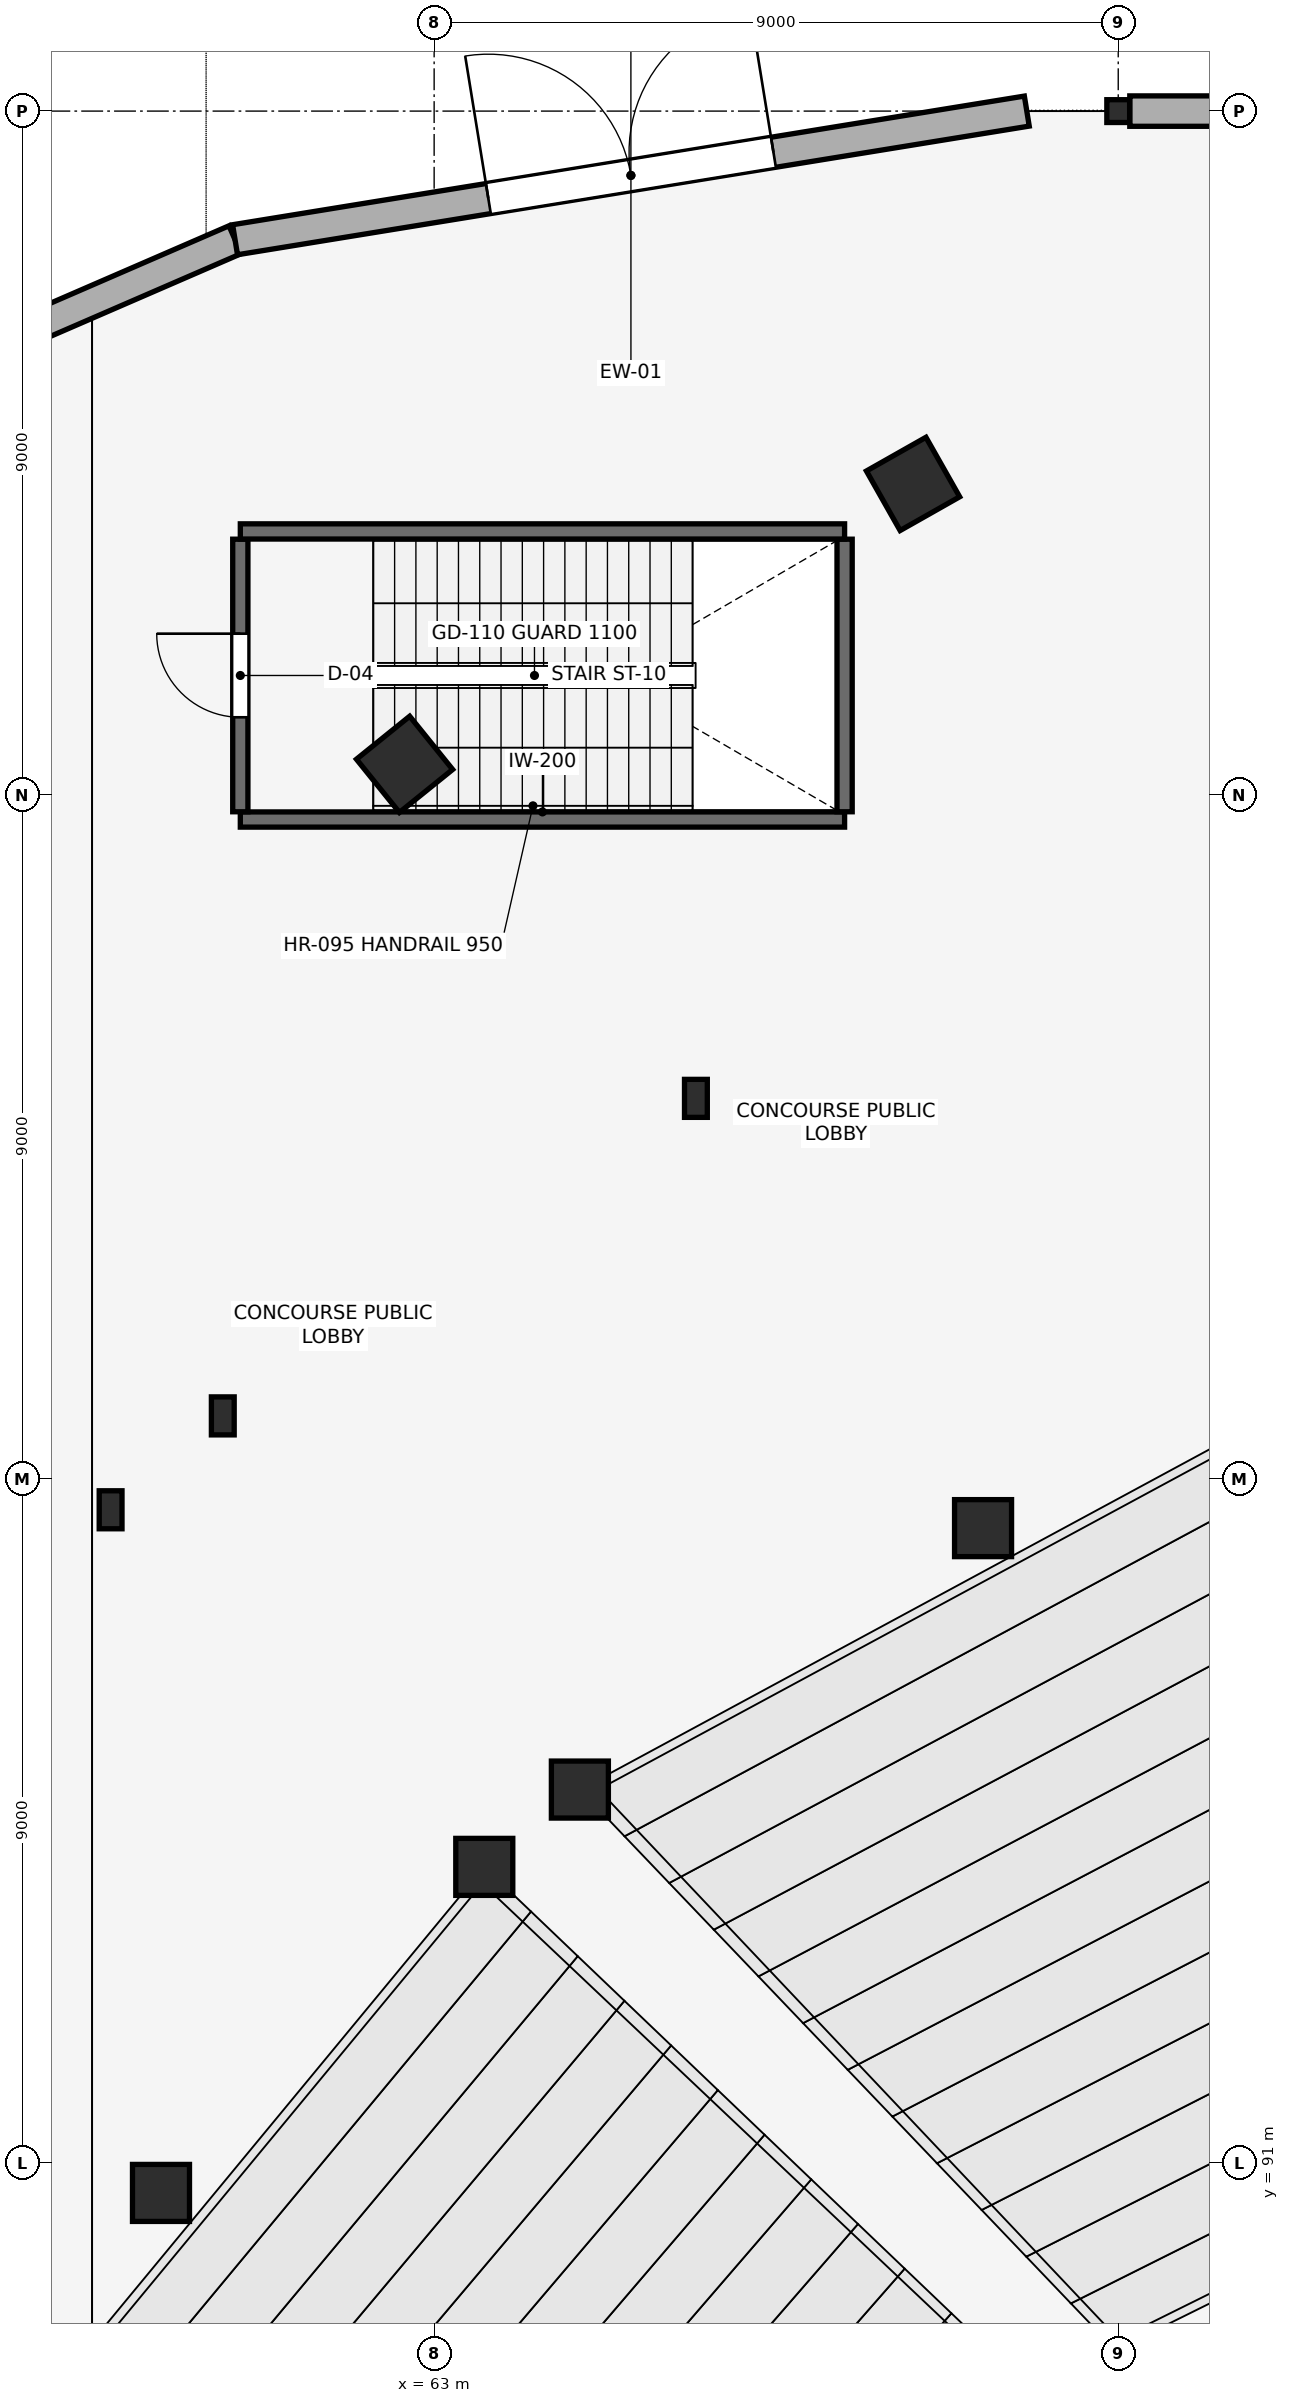
"""IFC4 building model, lengths in metres.
Left out: names, types, materials, properties, quantities, classifications, styles, units other than length and angle.
Written with IfcOpenShell. Run it as: python <this file> out.ifc"""

import sys

from ifc_helpers import new_model, si_unit, direction, frame, frame_2d, origin, origin_2d, place, context, subcontext, project, spatial, rectangle, hollow_rectangle, i_section, extrude, element, fill, save


model = new_model("IFC4")
c1 = context("Model", 3, precision=1e-05, world=origin(), true_north=direction((0.0, 1.0)))
c2 = subcontext(c1, "Body", "Model", "MODEL_VIEW")
j1 = project(units=[si_unit("LENGTHUNIT", "METRE"), si_unit("PLANEANGLEUNIT", "RADIAN")], contexts=[c1])
p1 = place(None, origin())
s1 = spatial("IfcSite", under=j1, at=p1, CompositionType="ELEMENT")
p2 = place(p1, origin())
s2 = spatial("IfcBuilding", under=s1, at=p2, CompositionType="ELEMENT")
p3 = place(p2, origin())
s3 = spatial("IfcBuildingStorey", under=s2, at=p3, CompositionType="ELEMENT", Elevation=0.0)
for number, where, z_axis, x_axis in (
    (1, (69.301, 113.095, 0.0), (0.0, 0.0, 1.0), (-0.493, 0.87, 0.0)),
    (2, (62.611, 109.406, 0.0), (0.0, 0.0, 1.0), (-0.628, 0.778, 0.0)),
):
    element("IfcColumn", number, at=place(p3, frame(where, z_axis=z_axis, x_axis=x_axis)), inside=s3, PredefinedType="COLUMN", context=c2, shape_type="SweptSolid", body=[
        extrude(rectangle(XDim=0.9, YDim=0.9, at=origin_2d()), origin(), (0.0, 0.0, 1.0), 5.4),
    ])
p4 = place(p3, frame((64.917, 95.918, 0.0), z_axis=(0.0, 0.0, 1.0), x_axis=(1.0, 0.0, 0.0)))
e3 = element("IfcColumn", 3, at=p4, inside=s3, PredefinedType="COLUMN", context=c2, shape_type="SweptSolid", body=[
    extrude(rectangle(XDim=0.75, YDim=0.75, at=origin_2d()), origin(), (0.0, 0.0, 1.0), 5.4),
])
p5 = place(p3, frame((60.219, 100.834, 0.0), z_axis=(0.0, 0.0, 1.0), x_axis=(1.0, 0.0, 0.0)))
e4 = element("IfcColumn", 4, at=p5, inside=s3, PredefinedType="COLUMN", context=c2, shape_type="SweptSolid", body=[
    extrude(i_section(OverallWidth=0.3, OverallDepth=0.5, WebThickness=0.014, FlangeThickness=0.028, FilletRadius=0.027, at=origin_2d()), origin(), (0.0, 0.0, 1.0), 5.4),
])
p6 = place(p3, frame((63.66, 94.901, 0.0), z_axis=(0.0, 0.0, 1.0), x_axis=(1.0, 0.0, 0.0)))
e5 = element("IfcColumn", 5, at=p6, inside=s3, PredefinedType="COLUMN", context=c2, shape_type="SweptSolid", body=[
    extrude(rectangle(XDim=0.75, YDim=0.75, at=origin_2d()), origin(), (0.0, 0.0, 1.0), 5.4),
])
p7 = place(p3, frame((58.743, 99.599, 0.0), z_axis=(0.0, 0.0, 1.0), x_axis=(1.0, 0.0, 0.0)))
e6 = element("IfcColumn", 6, at=p7, inside=s3, PredefinedType="COLUMN", context=c2, shape_type="SweptSolid", body=[
    extrude(i_section(OverallWidth=0.3, OverallDepth=0.5, WebThickness=0.014, FlangeThickness=0.028, FilletRadius=0.027, at=origin_2d()), origin(), (0.0, 0.0, 1.0), 5.4),
])
p8 = place(p3, frame((72.0, 118.0, 0.0), z_axis=(0.0, 0.0, 1.0), x_axis=(1.0, 0.0, 0.0)))
e7 = element("IfcColumn", 7, at=p8, inside=s3, PredefinedType="COLUMN", context=c2, shape_type="SweptSolid", body=[
    extrude(hollow_rectangle(XDim=0.3, YDim=0.3, WallThickness=0.012, at=origin_2d()), origin(), (0.0, 0.0, 1.0), 5.4),
])
p9 = place(p3, frame((70.222, 99.358, 0.0), z_axis=(0.0, 0.0, 1.0), x_axis=(1.0, 0.0, 0.0)))
e8 = element("IfcColumn", 8, at=p9, inside=s3, PredefinedType="COLUMN", context=c2, shape_type="SweptSolid", body=[
    extrude(rectangle(XDim=0.75, YDim=0.75, at=origin_2d()), origin(), (0.0, 0.0, 1.0), 5.4),
])
p10 = place(p3, frame((66.444, 105.012, 0.0), z_axis=(0.0, 0.0, 1.0), x_axis=(1.0, 0.0, 0.0)))
e9 = element("IfcColumn", 9, at=p10, inside=s3, PredefinedType="COLUMN", context=c2, shape_type="SweptSolid", body=[
    extrude(i_section(OverallWidth=0.3, OverallDepth=0.5, WebThickness=0.014, FlangeThickness=0.028, FilletRadius=0.027, at=origin_2d()), origin(), (0.0, 0.0, 1.0), 5.4),
])
p11 = place(p3, frame((59.406, 90.612, 0.0), z_axis=(0.0, 0.0, 1.0), x_axis=(1.0, 0.0, 0.0)))
e10 = element("IfcColumn", 10, at=p11, inside=s3, PredefinedType="COLUMN", context=c2, shape_type="SweptSolid", body=[
    extrude(rectangle(XDim=0.75, YDim=0.75, at=origin_2d()), origin(), (0.0, 0.0, 1.0), 5.4),
])
p12 = place(p3, frame((50.768, 112.138, 0.0), z_axis=(0.0, 0.0, 1.0), x_axis=(0.917436013805, 0.397883350461, 0.0)))
e11 = element("IfcWall", 11, at=p12, inside=s3, PredefinedType="STANDARD", context=c2, shape_type="SweptSolid", body=[
    extrude(rectangle(XDim=10.479, YDim=0.4, at=frame_2d((5.239, 0.0))), origin(), (0.0, 0.0, 1.0), 5.12),
])
p13 = place(p12, frame((3.339, 0.0, 0.0)))
e12 = element("IfcOpeningElement", 12, at=p13, cuts=e11, PredefinedType="OPENING", context=c2, shape_type="SweptSolid", body=[
    extrude(rectangle(XDim=3.8, YDim=2.8, at=frame_2d((1.9, 1.4))), frame((0.0, 0.21, 0.0), z_axis=(0.0, -1.0, 0.0), x_axis=(1.0, 0.0, 0.0)), (0.0, 0.0, 1.0), 0.42),
])
p14 = place(p3, frame((60.381, 116.308, 0.0), z_axis=(0.0, 0.0, 1.0), x_axis=(0.987056625979, 0.160372120738, 0.0)))
e13 = element("IfcWall", 13, at=p14, inside=s3, PredefinedType="STANDARD", context=c2, shape_type="SweptSolid", body=[
    extrude(rectangle(XDim=10.553, YDim=0.4, at=frame_2d((5.276, 0.0))), origin(), (0.0, 0.0, 1.0), 5.12),
])
p15 = place(p14, frame((3.376, 0.0, 0.0)))
e14 = element("IfcOpeningElement", 14, at=p15, cuts=e13, PredefinedType="OPENING", context=c2, shape_type="SweptSolid", body=[
    extrude(rectangle(XDim=3.8, YDim=2.8, at=frame_2d((1.9, 1.4))), frame((0.0, 0.21, 0.0), z_axis=(0.0, -1.0, 0.0), x_axis=(1.0, 0.0, 0.0)), (0.0, 0.0, 1.0), 0.42),
])
p16 = place(p3, frame((72.152, 118.0, 0.0), z_axis=(0.0, 0.0, 1.0), x_axis=(1.0, 0.0, 0.0)))
e15 = element("IfcWall", 15, at=p16, inside=s3, PredefinedType="STANDARD", context=c2, shape_type="SweptSolid", body=[
    extrude(rectangle(XDim=9.608, YDim=0.4, at=frame_2d((4.804, 0.0))), origin(), (0.0, 0.0, 1.0), 5.12),
])
p17 = place(p16, frame((2.904, 0.0, 0.0)))
e16 = element("IfcOpeningElement", 16, at=p17, cuts=e15, PredefinedType="OPENING", context=c2, shape_type="SweptSolid", body=[
    extrude(rectangle(XDim=3.8, YDim=2.8, at=frame_2d((1.9, 1.4))), frame((0.0, 0.21, 0.0), z_axis=(0.0, -1.0, 0.0), x_axis=(1.0, 0.0, 0.0)), (0.0, 0.0, 1.0), 0.42),
])
p18 = place(p3, frame((60.45, 108.68, 0.0), z_axis=(0.0, 0.0, 1.0), x_axis=(1.0, 0.0, 0.0)))
e17 = element("IfcWall", 17, at=p18, inside=s3, PredefinedType="SHEAR", context=c2, shape_type="SweptSolid", body=[
    extrude(rectangle(XDim=7.95, YDim=0.2, at=frame_2d((3.975, 0.0))), origin(), (0.0, 0.0, 1.0), 5.4),
])
p19 = place(p3, frame((60.45, 108.782, 0.0), z_axis=(0.0, 0.0, 1.0), x_axis=(0.0, 1.0, 0.0)))
e18 = element("IfcWall", 18, at=p19, inside=s3, PredefinedType="SHEAR", context=c2, shape_type="SweptSolid", body=[
    extrude(rectangle(XDim=3.586, YDim=0.2, at=frame_2d((1.793, 0.0))), origin(), (0.0, 0.0, 1.0), 5.4),
])
p20 = place(p19, frame((1.243, 0.0, 0.0)))
e19 = element("IfcOpeningElement", 19, at=p20, cuts=e18, PredefinedType="OPENING", context=c2, shape_type="SweptSolid", body=[
    extrude(rectangle(XDim=1.1, YDim=2.15, at=frame_2d((0.55, 1.075))), frame((0.0, 0.11, 0.0), z_axis=(0.0, -1.0, 0.0), x_axis=(1.0, 0.0, 0.0)), (0.0, 0.0, 1.0), 0.22),
])
p21 = place(p3, frame((68.4, 108.782, 0.0), z_axis=(0.0, 0.0, 1.0), x_axis=(0.0, 1.0, 0.0)))
e20 = element("IfcWall", 20, at=p21, inside=s3, PredefinedType="SHEAR", context=c2, shape_type="SweptSolid", body=[
    extrude(rectangle(XDim=3.586, YDim=0.2, at=frame_2d((1.793, 0.0))), origin(), (0.0, 0.0, 1.0), 5.4),
])
p22 = place(p3, frame((60.45, 112.47, 0.0), z_axis=(0.0, 0.0, 1.0), x_axis=(1.0, 0.0, 0.0)))
e21 = element("IfcWall", 21, at=p22, inside=s3, PredefinedType="SHEAR", context=c2, shape_type="SweptSolid", body=[
    extrude(rectangle(XDim=7.95, YDim=0.2, at=frame_2d((3.975, 0.0))), origin(), (0.0, 0.0, 1.0), 5.4),
])
p23 = place(p15, origin())
e22 = element("IfcDoor", 22, at=p23, inside=s3, OperationType="DOUBLE_DOOR_SINGLE_SWING", PredefinedType="DOOR", context=c2, shape_type="SweptSolid", body=[
    extrude(rectangle(XDim=3.8, YDim=2.8, at=frame_2d((1.9, 1.4))), frame((0.0, 0.025, 0.0), z_axis=(0.0, -1.0, 0.0), x_axis=(1.0, 0.0, 0.0)), (0.0, 0.0, 1.0), 0.05),
])
fill(e14, e22)
p24 = place(p20, frame((1.1, 0.0, 0.0), z_axis=(0.0, 0.0, 1.0), x_axis=(-1.0, 0.0, 0.0)))
e23 = element("IfcDoor", 23, at=p24, inside=s3, OperationType="SINGLE_SWING_LEFT", PredefinedType="DOOR", context=c2, shape_type="SweptSolid", body=[
    extrude(rectangle(XDim=1.1, YDim=2.15, at=frame_2d((0.55, 1.075))), frame((0.0, 0.025, 0.0), z_axis=(0.0, -1.0, 0.0), x_axis=(1.0, 0.0, 0.0)), (0.0, 0.0, 1.0), 0.05),
])
fill(e19, e23)
save(model, sys.argv[1])
